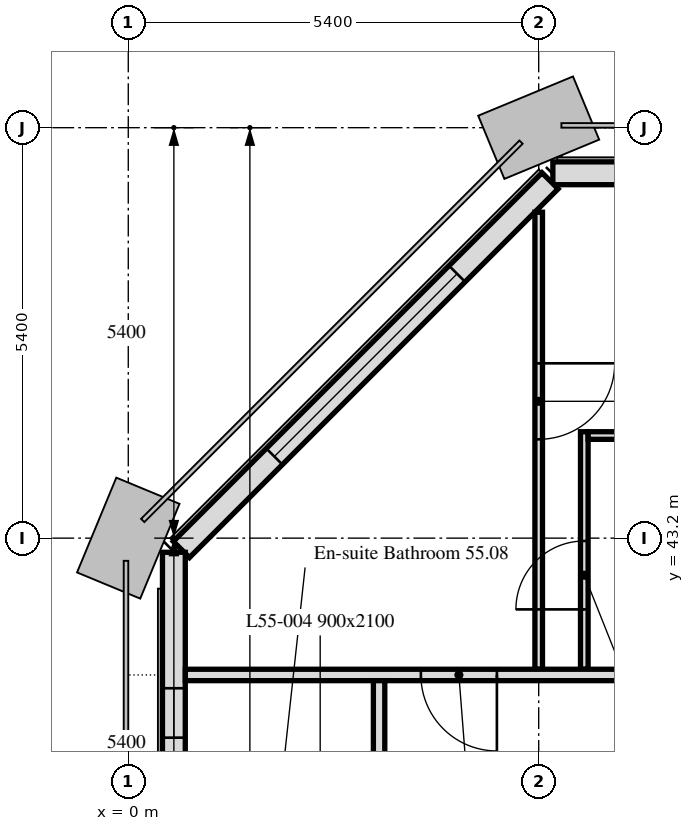
"""IFC4 building model, lengths in metres.
Left out: names, types, materials, properties, quantities, classifications, styles, units other than length and angle.
Written with IfcOpenShell. Run it as: python <this file> out.ifc"""

import sys

from ifc_helpers import new_model, si_unit, direction, frame, frame_2d, origin, place, context, subcontext, project, spatial, rectangle, extrude, element, fill, save


model = new_model("IFC4")
c1 = context("Model", 3, precision=1e-05, world=origin(), true_north=direction((0.0, 1.0)))
c2 = subcontext(c1, "Body", "Model", "MODEL_VIEW")
j1 = project(units=[si_unit("LENGTHUNIT", "METRE"), si_unit("PLANEANGLEUNIT", "RADIAN")], contexts=[c1])
p1 = place(None, origin())
s1 = spatial("IfcSite", under=j1, at=p1, CompositionType="ELEMENT")
p2 = place(p1, origin())
s2 = spatial("IfcBuilding", under=s1, at=p2, CompositionType="ELEMENT")
p3 = place(p2, frame((0.0, 0.0, 220.3)))
s3 = spatial("IfcBuildingStorey", under=s2, at=p3, CompositionType="ELEMENT", Elevation=220.3)
p4 = place(p3, frame((37.614, 48.0, 0.0), z_axis=(0.0, 0.0, 1.0), x_axis=(-1.0, 0.0, 0.0)))
e1 = element("IfcWall", 1, at=p4, inside=s3, PredefinedType="SOLIDWALL", context=c2, shape_type="SweptSolid", body=[
    extrude(rectangle(XDim=32.027, YDim=0.3, at=frame_2d((16.014, 0.0))), origin(), (0.0, 0.0, 1.0), 3.0),
])
p5 = place(p4, frame((0.814, 0.0, 0.9)))
e2 = element("IfcOpeningElement", 2, at=p5, cuts=e1, PredefinedType="OPENING", context=c2, shape_type="SweptSolid", body=[
    extrude(rectangle(XDim=3.4, YDim=1.7, at=frame_2d((1.7, 0.85))), frame((0.0, 0.16, 0.0), z_axis=(0.0, -1.0, 0.0), x_axis=(1.0, 0.0, 0.0)), (0.0, 0.0, 1.0), 0.32),
])
p6 = place(p4, frame((6.564, 0.0, 0.9)))
e3 = element("IfcOpeningElement", 3, at=p6, cuts=e1, PredefinedType="OPENING", context=c2, shape_type="SweptSolid", body=[
    extrude(rectangle(XDim=1.1, YDim=1.7, at=frame_2d((0.55, 0.85))), frame((0.0, 0.16, 0.0), z_axis=(0.0, -1.0, 0.0), x_axis=(1.0, 0.0, 0.0)), (0.0, 0.0, 1.0), 0.32),
])
p7 = place(p4, frame((11.614, 0.0, 0.9)))
e4 = element("IfcOpeningElement", 4, at=p7, cuts=e1, PredefinedType="OPENING", context=c2, shape_type="SweptSolid", body=[
    extrude(rectangle(XDim=3.4, YDim=1.7, at=frame_2d((1.7, 0.85))), frame((0.0, 0.16, 0.0), z_axis=(0.0, -1.0, 0.0), x_axis=(1.0, 0.0, 0.0)), (0.0, 0.0, 1.0), 0.32),
])
p8 = place(p4, frame((17.364, 0.0, 0.9)))
e5 = element("IfcOpeningElement", 5, at=p8, cuts=e1, PredefinedType="OPENING", context=c2, shape_type="SweptSolid", body=[
    extrude(rectangle(XDim=1.1, YDim=1.7, at=frame_2d((0.55, 0.85))), frame((0.0, 0.16, 0.0), z_axis=(0.0, -1.0, 0.0), x_axis=(1.0, 0.0, 0.0)), (0.0, 0.0, 1.0), 0.32),
])
p9 = place(p4, frame((22.414, 0.0, 0.9)))
e6 = element("IfcOpeningElement", 6, at=p9, cuts=e1, PredefinedType="OPENING", context=c2, shape_type="SweptSolid", body=[
    extrude(rectangle(XDim=3.4, YDim=1.7, at=frame_2d((1.7, 0.85))), frame((0.0, 0.16, 0.0), z_axis=(0.0, -1.0, 0.0), x_axis=(1.0, 0.0, 0.0)), (0.0, 0.0, 1.0), 0.32),
])
p10 = place(p4, frame((28.164, 0.0, 0.9)))
e7 = element("IfcOpeningElement", 7, at=p10, cuts=e1, PredefinedType="OPENING", context=c2, shape_type="SweptSolid", body=[
    extrude(rectangle(XDim=1.1, YDim=1.7, at=frame_2d((0.55, 0.85))), frame((0.0, 0.16, 0.0), z_axis=(0.0, -1.0, 0.0), x_axis=(1.0, 0.0, 0.0)), (0.0, 0.0, 1.0), 0.32),
])
p11 = place(p3, frame((5.55, 47.901, 0.0), z_axis=(0.0, 0.0, 1.0), x_axis=(-0.707106781187, -0.707106781187, 0.0)))
e8 = element("IfcWall", 8, at=p11, inside=s3, PredefinedType="SOLIDWALL", context=c2, shape_type="SweptSolid", body=[
    extrude(rectangle(XDim=6.86, YDim=0.3, at=frame_2d((3.43, 0.0))), origin(), (0.0, 0.0, 1.0), 3.0),
])
p12 = place(p11, frame((1.73, 0.0, 0.9)))
e9 = element("IfcOpeningElement", 9, at=p12, cuts=e8, PredefinedType="OPENING", context=c2, shape_type="SweptSolid", body=[
    extrude(rectangle(XDim=3.4, YDim=1.7, at=frame_2d((1.7, 0.85))), frame((0.0, 0.16, 0.0), z_axis=(0.0, -1.0, 0.0), x_axis=(1.0, 0.0, 0.0)), (0.0, 0.0, 1.0), 0.32),
])
p13 = place(p3, frame((0.6, 43.014, 0.0), z_axis=(0.0, 0.0, 1.0), x_axis=(0.0, -1.0, 0.0)))
e10 = element("IfcWall", 10, at=p13, inside=s3, PredefinedType="SOLIDWALL", context=c2, shape_type="SweptSolid", body=[
    extrude(rectangle(XDim=32.027, YDim=0.3, at=frame_2d((16.014, 0.0))), origin(), (0.0, 0.0, 1.0), 3.0),
])
p14 = place(p13, frame((1.789, 0.0, 0.9)))
e11 = element("IfcOpeningElement", 11, at=p14, cuts=e10, PredefinedType="OPENING", context=c2, shape_type="SweptSolid", body=[
    extrude(rectangle(XDim=0.65, YDim=1.7, at=frame_2d((0.325, 0.85))), frame((0.0, 0.16, 0.0), z_axis=(0.0, -1.0, 0.0), x_axis=(1.0, 0.0, 0.0)), (0.0, 0.0, 1.0), 0.32),
])
p15 = place(p13, frame((2.764, 0.0, 0.9)))
e12 = element("IfcOpeningElement", 12, at=p15, cuts=e10, PredefinedType="OPENING", context=c2, shape_type="SweptSolid", body=[
    extrude(rectangle(XDim=1.1, YDim=1.7, at=frame_2d((0.55, 0.85))), frame((0.0, 0.16, 0.0), z_axis=(0.0, -1.0, 0.0), x_axis=(1.0, 0.0, 0.0)), (0.0, 0.0, 1.0), 0.32),
])
p16 = place(p13, frame((6.564, 0.0, 0.9)))
e13 = element("IfcOpeningElement", 13, at=p16, cuts=e10, PredefinedType="OPENING", context=c2, shape_type="SweptSolid", body=[
    extrude(rectangle(XDim=1.1, YDim=1.7, at=frame_2d((0.55, 0.85))), frame((0.0, 0.16, 0.0), z_axis=(0.0, -1.0, 0.0), x_axis=(1.0, 0.0, 0.0)), (0.0, 0.0, 1.0), 0.32),
])
p17 = place(p13, frame((8.164, 0.0, 0.9)))
e14 = element("IfcOpeningElement", 14, at=p17, cuts=e10, PredefinedType="OPENING", context=c2, shape_type="SweptSolid", body=[
    extrude(rectangle(XDim=1.1, YDim=1.7, at=frame_2d((0.55, 0.85))), frame((0.0, 0.16, 0.0), z_axis=(0.0, -1.0, 0.0), x_axis=(1.0, 0.0, 0.0)), (0.0, 0.0, 1.0), 0.32),
])
p18 = place(p13, frame((11.614, 0.0, 0.9)))
e15 = element("IfcOpeningElement", 15, at=p18, cuts=e10, PredefinedType="OPENING", context=c2, shape_type="SweptSolid", body=[
    extrude(rectangle(XDim=3.4, YDim=1.7, at=frame_2d((1.7, 0.85))), frame((0.0, 0.16, 0.0), z_axis=(0.0, -1.0, 0.0), x_axis=(1.0, 0.0, 0.0)), (0.0, 0.0, 1.0), 0.32),
])
p19 = place(p13, frame((17.364, 0.0, 0.9)))
e16 = element("IfcOpeningElement", 16, at=p19, cuts=e10, PredefinedType="OPENING", context=c2, shape_type="SweptSolid", body=[
    extrude(rectangle(XDim=1.1, YDim=1.7, at=frame_2d((0.55, 0.85))), frame((0.0, 0.16, 0.0), z_axis=(0.0, -1.0, 0.0), x_axis=(1.0, 0.0, 0.0)), (0.0, 0.0, 1.0), 0.32),
])
p20 = place(p13, frame((18.964, 0.0, 0.9)))
e17 = element("IfcOpeningElement", 17, at=p20, cuts=e10, PredefinedType="OPENING", context=c2, shape_type="SweptSolid", body=[
    extrude(rectangle(XDim=1.1, YDim=1.7, at=frame_2d((0.55, 0.85))), frame((0.0, 0.16, 0.0), z_axis=(0.0, -1.0, 0.0), x_axis=(1.0, 0.0, 0.0)), (0.0, 0.0, 1.0), 0.32),
])
p21 = place(p13, frame((22.414, 0.0, 0.9)))
e18 = element("IfcOpeningElement", 18, at=p21, cuts=e10, PredefinedType="OPENING", context=c2, shape_type="SweptSolid", body=[
    extrude(rectangle(XDim=3.4, YDim=1.7, at=frame_2d((1.7, 0.85))), frame((0.0, 0.16, 0.0), z_axis=(0.0, -1.0, 0.0), x_axis=(1.0, 0.0, 0.0)), (0.0, 0.0, 1.0), 0.32),
])
p22 = place(p13, frame((28.164, 0.0, 0.9)))
e19 = element("IfcOpeningElement", 19, at=p22, cuts=e10, PredefinedType="OPENING", context=c2, shape_type="SweptSolid", body=[
    extrude(rectangle(XDim=1.1, YDim=1.7, at=frame_2d((0.55, 0.85))), frame((0.0, 0.16, 0.0), z_axis=(0.0, -1.0, 0.0), x_axis=(1.0, 0.0, 0.0)), (0.0, 0.0, 1.0), 0.32),
])
p23 = place(p13, frame((29.764, 0.0, 0.9)))
e20 = element("IfcOpeningElement", 20, at=p23, cuts=e10, PredefinedType="OPENING", context=c2, shape_type="SweptSolid", body=[
    extrude(rectangle(XDim=1.1, YDim=1.7, at=frame_2d((0.55, 0.85))), frame((0.0, 0.16, 0.0), z_axis=(0.0, -1.0, 0.0), x_axis=(1.0, 0.0, 0.0)), (0.0, 0.0, 1.0), 0.32),
])
p24 = place(p3, frame((5.4, 47.488, 0.0), z_axis=(0.0, 0.0, 1.0), x_axis=(0.0, -1.0, 0.0)))
e21 = element("IfcWall", 21, at=p24, inside=s3, PredefinedType="PARTITIONING", context=c2, shape_type="SweptSolid", body=[
    extrude(rectangle(XDim=6.013, YDim=0.1, at=frame_2d((3.006, 0.0))), origin(), (0.0, 0.0, 1.0), 3.0),
])
p25 = place(p24, frame((1.988, 0.0, 0.0)))
e22 = element("IfcOpeningElement", 22, at=p25, cuts=e21, PredefinedType="OPENING", context=c2, shape_type="SweptSolid", body=[
    extrude(rectangle(XDim=1.0, YDim=2.1, at=frame_2d((0.5, 1.05))), frame((0.0, 0.05, 0.0), z_axis=(0.0, -1.0, 0.0), x_axis=(1.0, 0.0, 0.0)), (0.0, 0.0, 1.0), 0.1),
])
p26 = place(p3, frame((6.0, 41.475, 0.0), z_axis=(0.0, 0.0, 1.0), x_axis=(0.0, 1.0, 0.0)))
e23 = element("IfcWall", 23, at=p26, inside=s3, PredefinedType="PARTITIONING", context=c2, shape_type="SweptSolid", body=[
    extrude(rectangle(XDim=3.125, YDim=0.1, at=frame_2d((1.562, 0.0))), origin(), (0.0, 0.0, 1.0), 3.0),
])
p27 = place(p26, frame((0.788, 0.0, 0.0)))
e24 = element("IfcOpeningElement", 24, at=p27, cuts=e23, PredefinedType="OPENING", context=c2, shape_type="SweptSolid", body=[
    extrude(rectangle(XDim=0.9, YDim=2.1, at=frame_2d((0.45, 1.05))), frame((0.0, 0.05, 0.0), z_axis=(0.0, -1.0, 0.0), x_axis=(1.0, 0.0, 0.0)), (0.0, 0.0, 1.0), 0.1),
])
p28 = place(p3, frame((6.05, 44.55, 0.0), z_axis=(0.0, 0.0, 1.0), x_axis=(1.0, 0.0, 0.0)))
e25 = element("IfcWall", 25, at=p28, inside=s3, PredefinedType="PARTITIONING", context=c2, shape_type="SweptSolid", body=[
    extrude(rectangle(XDim=2.4, YDim=0.1, at=frame_2d((1.2, 0.0))), origin(), (0.0, 0.0, 1.0), 3.0),
])
p29 = place(p3, frame((42.449, 41.4, 0.0), z_axis=(0.0, 0.0, 1.0), x_axis=(-1.0, 0.0, 0.0)))
e26 = element("IfcWall", 26, at=p29, inside=s3, PredefinedType="PARTITIONING", context=c2, shape_type="SweptSolid", body=[
    extrude(rectangle(XDim=41.698, YDim=0.15, at=frame_2d((20.849, 0.0))), origin(), (0.0, 0.0, 1.0), 2.4),
])
p30 = place(p29, frame((1.449, 0.0, 0.0)))
e27 = element("IfcOpeningElement", 27, at=p30, cuts=e26, PredefinedType="OPENING", context=c2, shape_type="SweptSolid", body=[
    extrude(rectangle(XDim=1.0, YDim=2.1, at=frame_2d((0.5, 1.05))), frame((0.0, 0.075, 0.0), z_axis=(0.0, -1.0, 0.0), x_axis=(1.0, 0.0, 0.0)), (0.0, 0.0, 1.0), 0.15),
])
p31 = place(p29, frame((29.249, 0.0, 0.0)))
e28 = element("IfcOpeningElement", 28, at=p31, cuts=e26, PredefinedType="OPENING", context=c2, shape_type="SweptSolid", body=[
    extrude(rectangle(XDim=1.0, YDim=2.1, at=frame_2d((0.5, 1.05))), frame((0.0, 0.075, 0.0), z_axis=(0.0, -1.0, 0.0), x_axis=(1.0, 0.0, 0.0)), (0.0, 0.0, 1.0), 0.15),
])
p32 = place(p29, frame((37.599, 0.0, 0.0)))
e29 = element("IfcOpeningElement", 29, at=p32, cuts=e26, PredefinedType="OPENING", context=c2, shape_type="SweptSolid", body=[
    extrude(rectangle(XDim=1.0, YDim=2.1, at=frame_2d((0.5, 1.05))), frame((0.0, 0.075, 0.0), z_axis=(0.0, -1.0, 0.0), x_axis=(1.0, 0.0, 0.0)), (0.0, 0.0, 1.0), 0.15),
])
p33 = place(p29, frame((17.649, 0.0, 0.0)))
e30 = element("IfcOpeningElement", 30, at=p33, cuts=e26, PredefinedType="OPENING", context=c2, shape_type="SweptSolid", body=[
    extrude(rectangle(XDim=1.0, YDim=2.1, at=frame_2d((0.5, 1.05))), frame((0.0, 0.075, 0.0), z_axis=(0.0, -1.0, 0.0), x_axis=(1.0, 0.0, 0.0)), (0.0, 0.0, 1.0), 0.15),
])
p34 = place(p3, frame((3.3, 11.325, 0.0), z_axis=(0.0, 0.0, 1.0), x_axis=(0.0, 1.0, 0.0)))
e31 = element("IfcWall", 31, at=p34, inside=s3, PredefinedType="PARTITIONING", context=c2, shape_type="SweptSolid", body=[
    extrude(rectangle(XDim=30.0, YDim=0.15, at=frame_2d((15.0, 0.0))), origin(), (0.0, 0.0, 1.0), 2.4),
])
p35 = place(p34, frame((17.875, 0.0, 0.0)))
e32 = element("IfcOpeningElement", 32, at=p35, cuts=e31, PredefinedType="OPENING", context=c2, shape_type="SweptSolid", body=[
    extrude(rectangle(XDim=1.0, YDim=2.1, at=frame_2d((0.5, 1.05))), frame((0.0, 0.075, 0.0), z_axis=(0.0, -1.0, 0.0), x_axis=(1.0, 0.0, 0.0)), (0.0, 0.0, 1.0), 0.15),
])
p36 = place(p34, frame((1.9, 0.0, 0.0)))
e33 = element("IfcOpeningElement", 33, at=p36, cuts=e31, PredefinedType="OPENING", context=c2, shape_type="SweptSolid", body=[
    extrude(rectangle(XDim=1.0, YDim=2.1, at=frame_2d((0.5, 1.05))), frame((0.0, 0.075, 0.0), z_axis=(0.0, -1.0, 0.0), x_axis=(1.0, 0.0, 0.0)), (0.0, 0.0, 1.0), 0.15),
])
p37 = place(p34, frame((23.725, 0.0, 0.0)))
e34 = element("IfcOpeningElement", 34, at=p37, cuts=e31, PredefinedType="OPENING", context=c2, shape_type="SweptSolid", body=[
    extrude(rectangle(XDim=1.0, YDim=2.1, at=frame_2d((0.5, 1.05))), frame((0.0, 0.075, 0.0), z_axis=(0.0, -1.0, 0.0), x_axis=(1.0, 0.0, 0.0)), (0.0, 0.0, 1.0), 0.15),
])
p38 = place(p34, frame((8.425, 0.0, 0.0)))
e35 = element("IfcOpeningElement", 35, at=p38, cuts=e31, PredefinedType="OPENING", context=c2, shape_type="SweptSolid", body=[
    extrude(rectangle(XDim=1.0, YDim=2.1, at=frame_2d((0.5, 1.05))), frame((0.0, 0.075, 0.0), z_axis=(0.0, -1.0, 0.0), x_axis=(1.0, 0.0, 0.0)), (0.0, 0.0, 1.0), 0.15),
])
p39 = place(p12, origin())
e36 = element("IfcWindow", 36, at=p39, inside=s3, PartitioningType="SINGLE_PANEL", PredefinedType="WINDOW", context=c2, shape_type="SweptSolid", body=[
    extrude(rectangle(XDim=3.4, YDim=1.7, at=frame_2d((1.7, 0.85))), frame((0.0, 0.03, 0.0), z_axis=(0.0, -1.0, 0.0), x_axis=(1.0, 0.0, 0.0)), (0.0, 0.0, 1.0), 0.06),
])
fill(e9, e36)
p40 = place(p14, origin())
e37 = element("IfcWindow", 37, at=p40, inside=s3, PartitioningType="SINGLE_PANEL", PredefinedType="WINDOW", context=c2, shape_type="SweptSolid", body=[
    extrude(rectangle(XDim=0.65, YDim=1.7, at=frame_2d((0.325, 0.85))), frame((0.0, 0.03, 0.0), z_axis=(0.0, -1.0, 0.0), x_axis=(1.0, 0.0, 0.0)), (0.0, 0.0, 1.0), 0.06),
])
fill(e11, e37)
p41 = place(p27, origin())
e38 = element("IfcDoor", 38, at=p41, inside=s3, OperationType="SINGLE_SWING_RIGHT", PredefinedType="DOOR", context=c2, shape_type="SweptSolid", body=[
    extrude(rectangle(XDim=0.9, YDim=2.1, at=frame_2d((0.45, 1.05))), frame((0.0, 0.025, 0.0), z_axis=(0.0, -1.0, 0.0), x_axis=(1.0, 0.0, 0.0)), (0.0, 0.0, 1.0), 0.05),
])
fill(e24, e38)
p42 = place(p25, origin())
e39 = element("IfcDoor", 39, at=p42, inside=s3, OperationType="SINGLE_SWING_RIGHT", PredefinedType="DOOR", context=c2, shape_type="SweptSolid", body=[
    extrude(rectangle(XDim=1.0, YDim=2.1, at=frame_2d((0.5, 1.05))), frame((0.0, 0.025, 0.0), z_axis=(0.0, -1.0, 0.0), x_axis=(1.0, 0.0, 0.0)), (0.0, 0.0, 1.0), 0.05),
])
fill(e22, e39)
p43 = place(p32, origin())
e40 = element("IfcDoor", 40, at=p43, inside=s3, OperationType="SINGLE_SWING_RIGHT", PredefinedType="DOOR", context=c2, shape_type="SweptSolid", body=[
    extrude(rectangle(XDim=1.0, YDim=2.1, at=frame_2d((0.5, 1.05))), frame((0.0, 0.025, 0.0), z_axis=(0.0, -1.0, 0.0), x_axis=(1.0, 0.0, 0.0)), (0.0, 0.0, 1.0), 0.05),
])
fill(e29, e40)
save(model, sys.argv[1])
